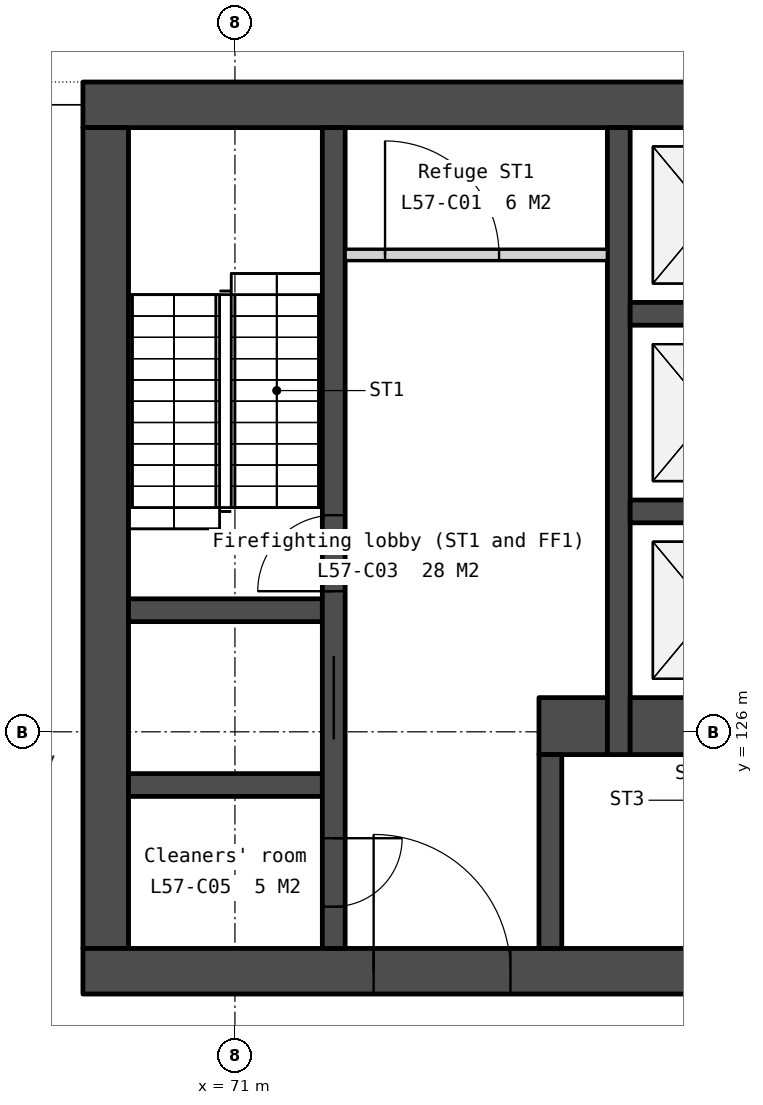
"""IFC4 building model, lengths in metres.
Left out: names, types, materials, properties, quantities, classifications, styles, units other than length and angle.
Written with IfcOpenShell. Run it as: python <this file> out.ifc"""

import sys

from ifc_helpers import new_model, si_unit, direction, frame, frame_2d, origin, place, context, subcontext, project, spatial, rectangle, extrude, element, fill, save


model = new_model("IFC4")
c1 = context("Model", 3, precision=1e-05, world=origin(), true_north=direction((0.0, 1.0)))
c2 = subcontext(c1, "Body", "Model", "MODEL_VIEW")
j1 = project(units=[si_unit("LENGTHUNIT", "METRE"), si_unit("PLANEANGLEUNIT", "RADIAN")], contexts=[c1])
p1 = place(None, origin())
s1 = spatial("IfcSite", under=j1, at=p1, CompositionType="ELEMENT")
p2 = place(p1, origin())
s2 = spatial("IfcBuilding", under=s1, at=p2, CompositionType="ELEMENT")
p3 = place(p2, frame((0.0, 0.0, 227.0)))
s3 = spatial("IfcBuildingStorey", under=s2, at=p3, CompositionType="ELEMENT", Elevation=227.0)
p4 = place(p3, frame((69.0, 134.25, 0.0), z_axis=(0.0, 0.0, 1.0), x_axis=(1.0, 0.0, 0.0)))
e1 = element("IfcWall", 1, at=p4, inside=s3, PredefinedType="SOLIDWALL", context=c2, shape_type="SweptSolid", body=[
    extrude(rectangle(XDim=22.0, YDim=0.6, at=frame_2d((11.0, 0.0))), origin(), (0.0, 0.0, 1.0), 11.25),
])
p5 = place(p3, frame((69.3, 133.95, 0.0), z_axis=(0.0, 0.0, 1.0), x_axis=(0.0, -1.0, 0.0)))
e2 = element("IfcWall", 2, at=p5, inside=s3, PredefinedType="SOLIDWALL", context=c2, shape_type="SweptSolid", body=[
    extrude(rectangle(XDim=10.8, YDim=0.6, at=frame_2d((5.4, 0.0))), origin(), (0.0, 0.0, 1.0), 11.25),
])
p6 = place(p3, frame((69.0, 122.85, 0.0), z_axis=(0.0, 0.0, 1.0), x_axis=(1.0, 0.0, 0.0)))
e3 = element("IfcWall", 3, at=p6, inside=s3, PredefinedType="SOLIDWALL", context=c2, shape_type="SweptSolid", body=[
    extrude(rectangle(XDim=22.0, YDim=0.6, at=frame_2d((11.0, 0.0))), origin(), (0.0, 0.0, 1.0), 11.25),
])
p7 = place(p6, frame((16.375, 0.0, 0.0)))
e4 = element("IfcOpeningElement", 4, at=p7, cuts=e3, PredefinedType="OPENING", context=c2, shape_type="SweptSolid", body=[
    extrude(rectangle(XDim=1.8, YDim=2.1, at=frame_2d((0.9, 1.05))), frame((0.0, 0.31, 0.0), z_axis=(0.0, -1.0, 0.0), x_axis=(1.0, 0.0, 0.0)), (0.0, 0.0, 1.0), 0.62),
])
p8 = place(p6, frame((3.825, 0.0, 0.0)))
e5 = element("IfcOpeningElement", 5, at=p8, cuts=e3, PredefinedType="OPENING", context=c2, shape_type="SweptSolid", body=[
    extrude(rectangle(XDim=1.8, YDim=2.1, at=frame_2d((0.9, 1.05))), frame((0.0, 0.31, 0.0), z_axis=(0.0, -1.0, 0.0), x_axis=(1.0, 0.0, 0.0)), (0.0, 0.0, 1.0), 0.62),
])
p9 = place(p6, frame((12.85, 0.0, 0.0)))
e6 = element("IfcOpeningElement", 6, at=p9, cuts=e3, PredefinedType="OPENING", context=c2, shape_type="SweptSolid", body=[
    extrude(rectangle(XDim=1.5, YDim=2.1, at=frame_2d((0.75, 1.05))), frame((0.0, 0.31, 0.0), z_axis=(0.0, -1.0, 0.0), x_axis=(1.0, 0.0, 0.0)), (0.0, 0.0, 1.0), 0.62),
])
for number, where, z_axis, x_axis in (
    (7, (69.6, 127.6, 0.0), (0.0, 0.0, 1.0), (1.0, 0.0, 0.0)),
    (8, (69.6, 125.3, 0.0), (0.0, 0.0, 1.0), (1.0, 0.0, 0.0)),
):
    element("IfcWall", number, at=place(p3, frame(where, z_axis=z_axis, x_axis=x_axis)), inside=s3, PredefinedType="SOLIDWALL", context=c2, shape_type="SweptSolid", body=[
        extrude(rectangle(XDim=2.55, YDim=0.3, at=frame_2d((1.275, 0.0))), origin(), (0.0, 0.0, 1.0), 11.25),
    ])
p10 = place(p3, frame((72.3, 133.95, 0.0), z_axis=(0.0, 0.0, 1.0), x_axis=(0.0, -1.0, 0.0)))
e9 = element("IfcWall", 9, at=p10, inside=s3, PredefinedType="SOLIDWALL", context=c2, shape_type="SweptSolid", body=[
    extrude(rectangle(XDim=10.8, YDim=0.3, at=frame_2d((5.4, 0.0))), origin(), (0.0, 0.0, 1.0), 11.25),
])
p11 = place(p10, frame((6.95, 0.0, 0.0)))
e10 = element("IfcOpeningElement", 10, at=p11, cuts=e9, PredefinedType="OPENING", context=c2, shape_type="SweptSolid", body=[
    extrude(rectangle(XDim=1.1, YDim=2.1, at=frame_2d((0.55, 1.05))), frame((0.0, 0.16, 0.0), z_axis=(0.0, -1.0, 0.0), x_axis=(1.0, 0.0, 0.0)), (0.0, 0.0, 1.0), 0.32),
])
p12 = place(p10, frame((9.35, 0.0, 0.0)))
e11 = element("IfcOpeningElement", 11, at=p12, cuts=e9, PredefinedType="OPENING", context=c2, shape_type="SweptSolid", body=[
    extrude(rectangle(XDim=0.9, YDim=2.1, at=frame_2d((0.45, 1.05))), frame((0.0, 0.16, 0.0), z_axis=(0.0, -1.0, 0.0), x_axis=(1.0, 0.0, 0.0)), (0.0, 0.0, 1.0), 0.32),
])
p13 = place(p10, frame((5.1, 0.0, 0.0)))
e12 = element("IfcOpeningElement", 12, at=p13, cuts=e9, PredefinedType="OPENING", context=c2, shape_type="SweptSolid", body=[
    extrude(rectangle(XDim=1.0, YDim=2.1, at=frame_2d((0.5, 1.05))), frame((0.0, 0.16, 0.0), z_axis=(0.0, -1.0, 0.0), x_axis=(1.0, 0.0, 0.0)), (0.0, 0.0, 1.0), 0.32),
])
p14 = place(p3, frame((72.45, 132.275, 0.0), z_axis=(0.0, 0.0, 1.0), x_axis=(1.0, 0.0, 0.0)))
e13 = element("IfcWall", 13, at=p14, inside=s3, PredefinedType="PARTITIONING", context=c2, shape_type="SweptSolid", body=[
    extrude(rectangle(XDim=3.45, YDim=0.15, at=frame_2d((1.725, 0.0))), origin(), (0.0, 0.0, 1.0), 11.25),
])
p15 = place(p14, frame((0.525, 0.0, 0.0)))
e14 = element("IfcOpeningElement", 14, at=p15, cuts=e13, PredefinedType="OPENING", context=c2, shape_type="SweptSolid", body=[
    extrude(rectangle(XDim=1.5, YDim=2.1, at=frame_2d((0.75, 1.05))), frame((0.0, 0.085, 0.0), z_axis=(0.0, -1.0, 0.0), x_axis=(1.0, 0.0, 0.0)), (0.0, 0.0, 1.0), 0.17),
])
p16 = place(p3, frame((75.0, 126.075, 0.0), z_axis=(0.0, 0.0, 1.0), x_axis=(1.0, 0.0, 0.0)))
e15 = element("IfcWall", 15, at=p16, inside=s3, PredefinedType="SOLIDWALL", context=c2, shape_type="SweptSolid", body=[
    extrude(rectangle(XDim=0.9, YDim=0.75, at=frame_2d((0.45, 0.0))), origin(), (0.0, 0.0, 1.0), 11.25),
])
p17 = place(p3, frame((75.15, 125.7, 0.0), z_axis=(0.0, 0.0, 1.0), x_axis=(0.0, -1.0, 0.0)))
e16 = element("IfcWall", 16, at=p17, inside=s3, PredefinedType="SOLIDWALL", context=c2, shape_type="SweptSolid", body=[
    extrude(rectangle(XDim=2.55, YDim=0.3, at=frame_2d((1.275, 0.0))), origin(), (0.0, 0.0, 1.0), 11.25),
])
p18 = place(p3, frame((76.05, 133.95, 0.0), z_axis=(0.0, 0.0, 1.0), x_axis=(0.0, -1.0, 0.0)))
e17 = element("IfcWall", 17, at=p18, inside=s3, PredefinedType="SOLIDWALL", context=c2, shape_type="SweptSolid", body=[
    extrude(rectangle(XDim=8.25, YDim=0.3, at=frame_2d((4.125, 0.0))), origin(), (0.0, 0.0, 1.0), 11.25),
])
for number, where, z_axis, x_axis in (
    (18, (76.2, 131.5, 0.0), (0.0, 0.0, 1.0), (1.0, 0.0, 0.0)),
    (19, (76.2, 128.9, 0.0), (0.0, 0.0, 1.0), (1.0, 0.0, 0.0)),
):
    element("IfcWall", number, at=place(p3, frame(where, z_axis=z_axis, x_axis=x_axis)), inside=s3, PredefinedType="SOLIDWALL", context=c2, shape_type="SweptSolid", body=[
        extrude(rectangle(XDim=2.1, YDim=0.3, at=frame_2d((1.05, 0.0))), origin(), (0.0, 0.0, 1.0), 11.25),
    ])
p19 = place(p3, frame((76.2, 126.075, 0.0), z_axis=(0.0, 0.0, 1.0), x_axis=(1.0, 0.0, 0.0)))
e20 = element("IfcWall", 20, at=p19, inside=s3, PredefinedType="SOLIDWALL", context=c2, shape_type="SweptSolid", body=[
    extrude(rectangle(XDim=2.1, YDim=0.75, at=frame_2d((1.05, 0.0))), origin(), (0.0, 0.0, 1.0), 11.25),
])
p20 = place(p11, origin())
e21 = element("IfcDoor", 21, at=p20, inside=s3, OperationType="SLIDING_TO_LEFT", PredefinedType="DOOR", context=c2, shape_type="SweptSolid", body=[
    extrude(rectangle(XDim=1.1, YDim=2.1, at=frame_2d((0.55, 1.05))), frame((0.0, 0.025, 0.0), z_axis=(0.0, -1.0, 0.0), x_axis=(1.0, 0.0, 0.0)), (0.0, 0.0, 1.0), 0.05),
])
fill(e10, e21)
p21 = place(p8, origin())
e22 = element("IfcDoor", 22, at=p21, inside=s3, OperationType="DOUBLE_DOOR_DOUBLE_SWING", PredefinedType="DOOR", context=c2, shape_type="SweptSolid", body=[
    extrude(rectangle(XDim=1.8, YDim=2.1, at=frame_2d((0.9, 1.05))), frame((0.0, 0.025, 0.0), z_axis=(0.0, -1.0, 0.0), x_axis=(1.0, 0.0, 0.0)), (0.0, 0.0, 1.0), 0.05),
])
fill(e5, e22)
p22 = place(p15, origin())
e23 = element("IfcDoor", 23, at=p22, inside=s3, OperationType="DOUBLE_DOOR_DOUBLE_SWING", PredefinedType="DOOR", context=c2, shape_type="SweptSolid", body=[
    extrude(rectangle(XDim=1.5, YDim=2.1, at=frame_2d((0.75, 1.05))), frame((0.0, 0.025, 0.0), z_axis=(0.0, -1.0, 0.0), x_axis=(1.0, 0.0, 0.0)), (0.0, 0.0, 1.0), 0.05),
])
fill(e14, e23)
p23 = place(p12, origin())
e24 = element("IfcDoor", 24, at=p23, inside=s3, OperationType="SINGLE_SWING_LEFT", PredefinedType="DOOR", context=c2, shape_type="SweptSolid", body=[
    extrude(rectangle(XDim=0.9, YDim=2.1, at=frame_2d((0.45, 1.05))), frame((0.0, 0.025, 0.0), z_axis=(0.0, -1.0, 0.0), x_axis=(1.0, 0.0, 0.0)), (0.0, 0.0, 1.0), 0.05),
])
fill(e11, e24)
p24 = place(p13, origin())
e25 = element("IfcDoor", 25, at=p24, inside=s3, OperationType="SINGLE_SWING_RIGHT", PredefinedType="DOOR", context=c2, shape_type="SweptSolid", body=[
    extrude(rectangle(XDim=1.0, YDim=2.1, at=frame_2d((0.5, 1.05))), frame((0.0, 0.025, 0.0), z_axis=(0.0, -1.0, 0.0), x_axis=(1.0, 0.0, 0.0)), (0.0, 0.0, 1.0), 0.05),
])
fill(e12, e25)
save(model, sys.argv[1])
